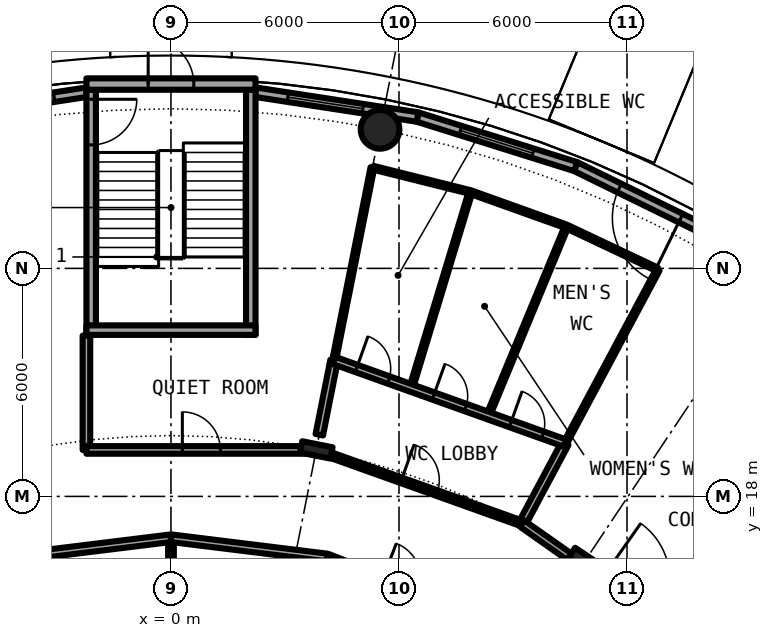
"""IFC4 building model, lengths in metres.
Left out: names, types, materials, properties, quantities, classifications, styles, units other than length and angle.
Written with IfcOpenShell. Run it as: python <this file> out.ifc"""

import sys

from ifc_helpers import new_model, si_unit, direction, frame, frame_2d, origin, origin_2d, place, context, subcontext, project, spatial, rectangle, hollow_circle, i_section, extrude, element, fill, save


model = new_model("IFC4")
c1 = context("Model", 3, precision=1e-05, world=origin(), true_north=direction((0.0, 1.0)))
c2 = subcontext(c1, "Body", "Model", "MODEL_VIEW")
j1 = project(units=[si_unit("LENGTHUNIT", "METRE"), si_unit("PLANEANGLEUNIT", "RADIAN")], contexts=[c1])
p1 = place(None, origin())
s1 = spatial("IfcSite", under=j1, at=p1, CompositionType="ELEMENT")
p2 = place(p1, origin())
s2 = spatial("IfcBuilding", under=s1, at=p2, CompositionType="ELEMENT")
p3 = place(p2, frame((0.0, 0.0, 9.6)))
s3 = spatial("IfcBuildingStorey", under=s2, at=p3, CompositionType="ELEMENT", Elevation=9.6)
p4 = place(p3, frame((5.501, 27.658, 0.0), z_axis=(0.0, 0.0, 1.0), x_axis=(1.0, 0.0, 0.0)))
e1 = element("IfcColumn", 1, at=p4, inside=s3, PredefinedType="COLUMN", context=c2, shape_type="SweptSolid", body=[
    extrude(hollow_circle(Radius=0.508, WallThickness=0.05, at=origin_2d()), origin(), (0.0, 0.0, 1.0), 4.5),
])
for number, where, z_axis, x_axis in (
    (2, (10.889, 16.297, 0.0), (0.0, 0.0, 1.0), (0.556, 0.831, 0.0)),
    (3, (3.824, 19.223, 0.0), (0.0, 0.0, 1.0), (0.195, 0.981, 0.0)),
):
    element("IfcColumn", number, at=place(p3, frame(where, z_axis=z_axis, x_axis=x_axis)), inside=s3, PredefinedType="COLUMN", context=c2, shape_type="SweptSolid", body=[
        extrude(i_section(OverallWidth=0.303, OverallDepth=0.814, WebThickness=0.021, FlangeThickness=0.04, FilletRadius=0.03, at=origin_2d()), origin(), (0.0, 0.0, 1.0), 4.5),
    ])
p5 = place(p3, frame((14.564, 24.759, 0.0), z_axis=(0.0, 0.0, 1.0), x_axis=(-0.897938079481, 0.440121807478, 0.0)))
e4 = element("IfcWall", 4, at=p5, inside=s3, PredefinedType="SOLIDWALL", context=c2, shape_type="SweptSolid", body=[
    extrude(rectangle(XDim=4.36, YDim=0.25, at=frame_2d((2.18, 0.0))), origin(), (0.0, 0.0, 1.0), 4.05),
])
p6 = place(p5, frame((1.28, 0.0, 0.0)))
e5 = element("IfcOpeningElement", 5, at=p6, cuts=e4, PredefinedType="OPENING", context=c2, shape_type="SweptSolid", body=[
    extrude(rectangle(XDim=1.8, YDim=2.2, at=frame_2d((0.9, 1.1))), frame((0.0, 0.135, 0.0), z_axis=(0.0, -1.0, 0.0), x_axis=(1.0, 0.0, 0.0)), (0.0, 0.0, 1.0), 0.27),
])
p7 = place(p3, frame((10.649, 26.678, 0.0), z_axis=(0.0, 0.0, 1.0), x_axis=(-0.954219534331, 0.299107138498, 0.0)))
e6 = element("IfcWall", 6, at=p7, inside=s3, PredefinedType="SOLIDWALL", context=c2, shape_type="SweptSolid", body=[
    extrude(rectangle(XDim=4.359, YDim=0.25, at=frame_2d((2.18, 0.0))), origin(), (0.0, 0.0, 1.0), 4.05),
])
p8 = place(p7, frame((1.18, 0.0, 0.9)))
e7 = element("IfcOpeningElement", 7, at=p8, cuts=e6, PredefinedType="OPENING", context=c2, shape_type="SweptSolid", body=[
    extrude(rectangle(XDim=2.0, YDim=2.4, at=frame_2d((1.0, 1.2))), frame((0.0, 0.135, 0.0), z_axis=(0.0, -1.0, 0.0), x_axis=(1.0, 0.0, 0.0)), (0.0, 0.0, 1.0), 0.27),
])
p9 = place(p3, frame((6.489, 27.982, 0.0), z_axis=(0.0, 0.0, 1.0), x_axis=(-0.988472895049, 0.151397938406, 0.0)))
e8 = element("IfcWall", 8, at=p9, inside=s3, PredefinedType="SOLIDWALL", context=c2, shape_type="SweptSolid", body=[
    extrude(rectangle(XDim=4.314, YDim=0.25, at=frame_2d((2.157, 0.0))), origin(), (0.0, 0.0, 1.0), 4.05),
])
p10 = place(p9, frame((1.455, 0.0, 0.9)))
e9 = element("IfcOpeningElement", 9, at=p10, cuts=e8, PredefinedType="OPENING", context=c2, shape_type="SweptSolid", body=[
    extrude(rectangle(XDim=2.0, YDim=2.4, at=frame_2d((1.0, 1.2))), frame((0.0, 0.135, 0.0), z_axis=(0.0, -1.0, 0.0), x_axis=(1.0, 0.0, 0.0)), (0.0, 0.0, 1.0), 0.27),
])
p11 = place(p3, frame((-2.225, 28.635, 0.0), z_axis=(0.0, 0.0, 1.0), x_axis=(-0.988472895049, -0.151397938406, 0.0)))
e10 = element("IfcWall", 10, at=p11, inside=s3, PredefinedType="SOLIDWALL", context=c2, shape_type="SweptSolid", body=[
    extrude(rectangle(XDim=4.314, YDim=0.25, at=frame_2d((2.157, 0.0))), origin(), (0.0, 0.0, 1.0), 4.05),
])
p12 = place(p11, frame((0.859, 0.0, 0.9)))
e11 = element("IfcOpeningElement", 11, at=p12, cuts=e10, PredefinedType="OPENING", context=c2, shape_type="SweptSolid", body=[
    extrude(rectangle(XDim=2.0, YDim=2.4, at=frame_2d((1.0, 1.2))), frame((0.0, 0.135, 0.0), z_axis=(0.0, -1.0, 0.0), x_axis=(1.0, 0.0, 0.0)), (0.0, 0.0, 1.0), 0.27),
])
p13 = place(p3, frame((-2.1, 28.7, 0.0), z_axis=(0.0, 0.0, 1.0), x_axis=(0.0, -1.0, 0.0)))
e12 = element("IfcWall", 12, at=p13, inside=s3, PredefinedType="SHEAR", context=c2, shape_type="SweptSolid", body=[
    extrude(rectangle(XDim=6.45, YDim=0.25, at=frame_2d((3.225, 0.0))), origin(), (0.0, 0.0, 1.0), 4.5),
])
p14 = place(p13, frame((0.25, 0.0, 0.0)))
e13 = element("IfcOpeningElement", 13, at=p14, cuts=e12, PredefinedType="OPENING", context=c2, shape_type="SweptSolid", body=[
    extrude(rectangle(XDim=1.2, YDim=2.3, at=frame_2d((0.6, 1.15))), frame((0.0, 0.135, 0.0), z_axis=(0.0, -1.0, 0.0), x_axis=(1.0, 0.0, 0.0)), (0.0, 0.0, 1.0), 0.27),
])
p15 = place(p3, frame((2.1, 22.25, 0.0), z_axis=(0.0, 0.0, 1.0), x_axis=(0.0, 1.0, 0.0)))
e14 = element("IfcWall", 14, at=p15, inside=s3, PredefinedType="SHEAR", context=c2, shape_type="SweptSolid", body=[
    extrude(rectangle(XDim=6.45, YDim=0.25, at=frame_2d((3.225, 0.0))), origin(), (0.0, 0.0, 1.0), 4.5),
])
p16 = place(p3, frame((2.225, 22.375, 0.0), z_axis=(0.0, 0.0, 1.0), x_axis=(-1.0, 0.0, 0.0)))
e15 = element("IfcWall", 15, at=p16, inside=s3, PredefinedType="SHEAR", context=c2, shape_type="SweptSolid", body=[
    extrude(rectangle(XDim=4.45, YDim=0.25, at=frame_2d((2.225, 0.0))), origin(), (0.0, 0.0, 1.0), 4.5),
])
p17 = place(p3, frame((-2.225, 28.85, 0.0), z_axis=(0.0, 0.0, 1.0), x_axis=(1.0, 0.0, 0.0)))
e16 = element("IfcWall", 16, at=p17, inside=s3, PredefinedType="SHEAR", context=c2, shape_type="SweptSolid", body=[
    extrude(rectangle(XDim=4.45, YDim=0.3, at=frame_2d((2.225, 0.0))), origin(), (0.0, 0.0, 1.0), 4.5),
])
p18 = place(p17, frame((1.625, 0.0, 0.0)))
e17 = element("IfcOpeningElement", 17, at=p18, cuts=e16, PredefinedType="OPENING", context=c2, shape_type="SweptSolid", body=[
    extrude(rectangle(XDim=1.2, YDim=2.3, at=frame_2d((0.6, 1.15))), frame((0.0, 0.16, 0.0), z_axis=(0.0, -1.0, 0.0), x_axis=(1.0, 0.0, 0.0)), (0.0, 0.0, 1.0), 0.32),
])
p19 = place(p3, frame((0.0, 7.72, 0.0), z_axis=(0.0, 0.0, 1.0), x_axis=(0.0, 1.0, 0.0)))
e18 = element("IfcWall", 18, at=p19, inside=s3, PredefinedType="PARTITIONING", context=c2, shape_type="SweptSolid", body=[
    extrude(rectangle(XDim=9.18, YDim=0.15, at=frame_2d((4.59, 0.0))), origin(), (0.0, 0.0, 1.0), 4.05),
])
p20 = place(p3, frame((3.903, 19.623, 0.0), z_axis=(0.0, 0.0, 1.0), x_axis=(0.195220503211, 0.980759376772, 0.0)))
e19 = element("IfcWall", 19, at=p20, inside=s3, PredefinedType="PARTITIONING", context=c2, shape_type="SweptSolid", body=[
    extrude(rectangle(XDim=1.992, YDim=0.2, at=frame_2d((0.996, 0.0))), origin(), (0.0, 0.0, 1.0), 4.05),
])
p21 = place(p3, frame((4.292, 21.577, 0.0), z_axis=(0.0, 0.0, 1.0), x_axis=(0.194963902417, 0.980810418355, 0.0)))
e20 = element("IfcWall", 20, at=p21, inside=s3, PredefinedType="PARTITIONING", context=c2, shape_type="SweptSolid", body=[
    extrude(rectangle(XDim=5.176, YDim=0.1, at=frame_2d((2.588, 0.0))), origin(), (0.0, 0.0, 1.0), 4.05),
])
p22 = place(p3, frame((6.319, 20.852, 0.0), z_axis=(0.0, 0.0, 1.0), x_axis=(0.289987267861, 0.957030503421, 0.0)))
e21 = element("IfcWall", 21, at=p22, inside=s3, PredefinedType="PARTITIONING", context=c2, shape_type="SweptSolid", body=[
    extrude(rectangle(XDim=5.386, YDim=0.1, at=frame_2d((2.693, 0.0))), origin(), (0.0, 0.0, 1.0), 4.05),
])
p23 = place(p3, frame((8.345, 20.127, 0.0), z_axis=(0.0, 0.0, 1.0), x_axis=(0.382973519041, 0.923759321313, 0.0)))
e22 = element("IfcWall", 22, at=p23, inside=s3, PredefinedType="PARTITIONING", context=c2, shape_type="SweptSolid", body=[
    extrude(rectangle(XDim=5.387, YDim=0.1, at=frame_2d((2.693, 0.0))), origin(), (0.0, 0.0, 1.0), 4.05),
])
p24 = place(p3, frame((9.242, 17.285, 0.0), z_axis=(0.0, 0.0, 1.0), x_axis=(0.471597030656, 0.88181417582, 0.0)))
e23 = element("IfcWall", 23, at=p24, inside=s3, PredefinedType="PARTITIONING", context=c2, shape_type="SweptSolid", body=[
    extrude(rectangle(XDim=2.398, YDim=0.2, at=frame_2d((1.199, 0.0))), origin(), (0.0, 0.0, 1.0), 4.05),
])
p25 = place(p3, frame((10.373, 19.401, 0.0), z_axis=(0.0, 0.0, 1.0), x_axis=(0.471444958676, 0.881895487537, 0.0)))
e24 = element("IfcWall", 24, at=p25, inside=s3, PredefinedType="PARTITIONING", context=c2, shape_type="SweptSolid", body=[
    extrude(rectangle(XDim=5.176, YDim=0.1, at=frame_2d((2.588, 0.0))), origin(), (0.0, 0.0, 1.0), 4.05),
])
p26 = place(p3, frame((-2.225, 19.223, 0.0), z_axis=(0.0, 0.0, 1.0), x_axis=(0.0, 1.0, 0.0)))
e25 = element("IfcWall", 25, at=p26, inside=s3, PredefinedType="PARTITIONING", context=c2, shape_type="SweptSolid", body=[
    extrude(rectangle(XDim=3.007, YDim=0.2, at=frame_2d((1.503, 0.0))), origin(), (0.0, 0.0, 1.0), 4.05),
])
for number, where, z_axis, x_axis in (
    (26, (-4.106, 16.394, 0.0), (0.0, 0.0, 1.0), (0.992, 0.122, 0.0)),
    (27, (0.0, 16.9, 0.0), (0.0, 0.0, 1.0), (0.992, -0.122, 0.0)),
):
    element("IfcWall", number, at=place(p3, frame(where, z_axis=z_axis, x_axis=x_axis)), inside=s3, PredefinedType="PARTITIONING", context=c2, shape_type="SweptSolid", body=[
        extrude(rectangle(XDim=4.137, YDim=0.2, at=frame_2d((2.068, 0.0))), origin(), (0.0, 0.0, 1.0), 4.05),
    ])
p27 = place(p3, frame((4.106, 16.394, 0.0), z_axis=(0.0, 0.0, 1.0), x_axis=(0.932943640288, -0.360022449363, 0.0)))
e28 = element("IfcWall", 28, at=p27, inside=s3, PredefinedType="PARTITIONING", context=c2, shape_type="SweptSolid", body=[
    extrude(rectangle(XDim=4.139, YDim=0.2, at=frame_2d((2.069, 0.0))), origin(), (0.0, 0.0, 1.0), 4.05),
])
p28 = place(p27, frame((1.569, 0.0, 0.0)))
e29 = element("IfcOpeningElement", 29, at=p28, cuts=e28, PredefinedType="OPENING", context=c2, shape_type="SweptSolid", body=[
    extrude(rectangle(XDim=1.0, YDim=2.3, at=frame_2d((0.5, 1.15))), frame((0.0, 0.11, 0.0), z_axis=(0.0, -1.0, 0.0), x_axis=(1.0, 0.0, 0.0)), (0.0, 0.0, 1.0), 0.22),
])
p29 = place(p3, frame((-2.225, 19.223, 0.0), z_axis=(0.0, 0.0, 1.0), x_axis=(1.0, 0.0, 0.0)))
e30 = element("IfcWall", 30, at=p29, inside=s3, PredefinedType="PARTITIONING", context=c2, shape_type="SweptSolid", body=[
    extrude(rectangle(XDim=5.894, YDim=0.2, at=frame_2d((2.947, 0.0))), origin(), (0.0, 0.0, 1.0), 3.63),
])
p30 = place(p29, frame((2.524, 0.0, 0.0)))
e31 = element("IfcOpeningElement", 31, at=p30, cuts=e30, PredefinedType="OPENING", context=c2, shape_type="SweptSolid", body=[
    extrude(rectangle(XDim=1.0, YDim=2.3, at=frame_2d((0.5, 1.15))), frame((0.0, 0.11, 0.0), z_axis=(0.0, -1.0, 0.0), x_axis=(1.0, 0.0, 0.0)), (0.0, 0.0, 1.0), 0.22),
])
p31 = place(p3, frame((3.968, 19.172, 0.0), z_axis=(0.0, 0.0, 1.0), x_axis=(0.941530584678, -0.336927526504, 0.0)))
e32 = element("IfcWall", 32, at=p31, inside=s3, PredefinedType="PARTITIONING", context=c2, shape_type="SweptSolid", body=[
    extrude(rectangle(XDim=5.598, YDim=0.15, at=frame_2d((2.799, 0.0))), origin(), (0.0, 0.0, 1.0), 3.63),
])
p32 = place(p31, frame((2.223, 0.0, 0.0)))
e33 = element("IfcOpeningElement", 33, at=p32, cuts=e32, PredefinedType="OPENING", context=c2, shape_type="SweptSolid", body=[
    extrude(rectangle(XDim=1.0, YDim=2.3, at=frame_2d((0.5, 1.15))), frame((0.0, 0.085, 0.0), z_axis=(0.0, -1.0, 0.0), x_axis=(1.0, 0.0, 0.0)), (0.0, 0.0, 1.0), 0.17),
])
p33 = place(p3, frame((9.239, 17.286, 0.0), z_axis=(0.0, 0.0, 1.0), x_axis=(0.817849682833, -0.575431921508, 0.0)))
e34 = element("IfcWall", 34, at=p33, inside=s3, PredefinedType="PARTITIONING", context=c2, shape_type="SweptSolid", body=[
    extrude(rectangle(XDim=1.771, YDim=0.2, at=frame_2d((0.885, 0.0))), origin(), (0.0, 0.0, 1.0), 3.63),
])
p34 = place(p3, frame((4.292, 21.577, 0.0), z_axis=(0.0, 0.0, 1.0), x_axis=(0.941534771306, -0.336915826909, 0.0)))
e35 = element("IfcWall", 35, at=p34, inside=s3, PredefinedType="PARTITIONING", context=c2, shape_type="SweptSolid", body=[
    extrude(rectangle(XDim=6.459, YDim=0.2, at=frame_2d((3.229, 0.0))), origin(), (0.0, 0.0, 1.0), 4.05),
])
p35 = place(p34, frame((4.931, 0.0, 0.0)))
e36 = element("IfcOpeningElement", 36, at=p35, cuts=e35, PredefinedType="OPENING", context=c2, shape_type="SweptSolid", body=[
    extrude(rectangle(XDim=0.9, YDim=2.3, at=frame_2d((0.45, 1.15))), frame((0.0, 0.11, 0.0), z_axis=(0.0, -1.0, 0.0), x_axis=(1.0, 0.0, 0.0)), (0.0, 0.0, 1.0), 0.22),
])
p36 = place(p34, frame((2.778, 0.0, 0.0)))
e37 = element("IfcOpeningElement", 37, at=p36, cuts=e35, PredefinedType="OPENING", context=c2, shape_type="SweptSolid", body=[
    extrude(rectangle(XDim=0.9, YDim=2.3, at=frame_2d((0.45, 1.15))), frame((0.0, 0.11, 0.0), z_axis=(0.0, -1.0, 0.0), x_axis=(1.0, 0.0, 0.0)), (0.0, 0.0, 1.0), 0.22),
])
p37 = place(p34, frame((0.626, 0.0, 0.0)))
e38 = element("IfcOpeningElement", 38, at=p37, cuts=e35, PredefinedType="OPENING", context=c2, shape_type="SweptSolid", body=[
    extrude(rectangle(XDim=0.9, YDim=2.3, at=frame_2d((0.45, 1.15))), frame((0.0, 0.11, 0.0), z_axis=(0.0, -1.0, 0.0), x_axis=(1.0, 0.0, 0.0)), (0.0, 0.0, 1.0), 0.22),
])
p38 = place(p3, frame((10.425, 25.094, 0.0), z_axis=(0.0, 0.0, 1.0), x_axis=(0.904075542006, -0.427372687882, 0.0)))
e39 = element("IfcWall", 39, at=p38, inside=s3, PredefinedType="PARTITIONING", context=c2, shape_type="SweptSolid", body=[
    extrude(rectangle(XDim=2.618, YDim=0.1, at=frame_2d((1.309, 0.0))), origin(), (0.0, 0.0, 1.0), 4.05),
])
p39 = place(p3, frame((7.899, 26.001, 0.0), z_axis=(0.0, 0.0, 1.0), x_axis=(0.94150976765, -0.336985693198, 0.0)))
e40 = element("IfcWall", 40, at=p39, inside=s3, PredefinedType="PARTITIONING", context=c2, shape_type="SweptSolid", body=[
    extrude(rectangle(XDim=2.644, YDim=0.1, at=frame_2d((1.322, 0.0))), origin(), (0.0, 0.0, 1.0), 4.05),
])
p40 = place(p3, frame((5.321, 26.648, 0.0), z_axis=(0.0, 0.0, 1.0), x_axis=(0.970054682641, -0.242886625171, 0.0)))
e41 = element("IfcWall", 41, at=p40, inside=s3, PredefinedType="PARTITIONING", context=c2, shape_type="SweptSolid", body=[
    extrude(rectangle(XDim=2.618, YDim=0.1, at=frame_2d((1.309, 0.0))), origin(), (0.0, 0.0, 1.0), 4.05),
])
p41 = place(p6, origin())
e42 = element("IfcDoor", 42, at=p41, inside=s3, OperationType="SINGLE_SWING_LEFT", PredefinedType="DOOR", context=c2, shape_type="SweptSolid", body=[
    extrude(rectangle(XDim=1.8, YDim=2.2, at=frame_2d((0.9, 1.1))), frame((0.0, 0.025, 0.0), z_axis=(0.0, -1.0, 0.0), x_axis=(1.0, 0.0, 0.0)), (0.0, 0.0, 1.0), 0.05),
])
fill(e5, e42)
p42 = place(p8, origin())
e43 = element("IfcWindow", 43, at=p42, inside=s3, PartitioningType="SINGLE_PANEL", PredefinedType="WINDOW", context=c2, shape_type="SweptSolid", body=[
    extrude(rectangle(XDim=2.0, YDim=2.4, at=frame_2d((1.0, 1.2))), frame((0.0, 0.03, 0.0), z_axis=(0.0, -1.0, 0.0), x_axis=(1.0, 0.0, 0.0)), (0.0, 0.0, 1.0), 0.06),
])
fill(e7, e43)
p43 = place(p10, origin())
e44 = element("IfcWindow", 44, at=p43, inside=s3, PartitioningType="SINGLE_PANEL", PredefinedType="WINDOW", context=c2, shape_type="SweptSolid", body=[
    extrude(rectangle(XDim=2.0, YDim=2.4, at=frame_2d((1.0, 1.2))), frame((0.0, 0.03, 0.0), z_axis=(0.0, -1.0, 0.0), x_axis=(1.0, 0.0, 0.0)), (0.0, 0.0, 1.0), 0.06),
])
fill(e9, e44)
p44 = place(p12, origin())
e45 = element("IfcWindow", 45, at=p44, inside=s3, PartitioningType="SINGLE_PANEL", PredefinedType="WINDOW", context=c2, shape_type="SweptSolid", body=[
    extrude(rectangle(XDim=2.0, YDim=2.4, at=frame_2d((1.0, 1.2))), frame((0.0, 0.03, 0.0), z_axis=(0.0, -1.0, 0.0), x_axis=(1.0, 0.0, 0.0)), (0.0, 0.0, 1.0), 0.06),
])
fill(e11, e45)
p45 = place(p14, origin())
e46 = element("IfcDoor", 46, at=p45, inside=s3, OperationType="SINGLE_SWING_RIGHT", PredefinedType="DOOR", context=c2, shape_type="SweptSolid", body=[
    extrude(rectangle(XDim=1.2, YDim=2.3, at=frame_2d((0.6, 1.15))), frame((0.0, 0.025, 0.0), z_axis=(0.0, -1.0, 0.0), x_axis=(1.0, 0.0, 0.0)), (0.0, 0.0, 1.0), 0.05),
])
fill(e13, e46)
p46 = place(p18, origin())
e47 = element("IfcDoor", 47, at=p46, inside=s3, OperationType="SINGLE_SWING_LEFT", PredefinedType="DOOR", context=c2, shape_type="SweptSolid", body=[
    extrude(rectangle(XDim=1.2, YDim=2.3, at=frame_2d((0.6, 1.15))), frame((0.0, 0.025, 0.0), z_axis=(0.0, -1.0, 0.0), x_axis=(1.0, 0.0, 0.0)), (0.0, 0.0, 1.0), 0.05),
])
fill(e17, e47)
p47 = place(p32, origin())
e48 = element("IfcDoor", 48, at=p47, inside=s3, OperationType="SINGLE_SWING_LEFT", PredefinedType="DOOR", context=c2, shape_type="SweptSolid", body=[
    extrude(rectangle(XDim=1.0, YDim=2.3, at=frame_2d((0.5, 1.15))), frame((0.0, 0.025, 0.0), z_axis=(0.0, -1.0, 0.0), x_axis=(1.0, 0.0, 0.0)), (0.0, 0.0, 1.0), 0.05),
])
fill(e33, e48)
p48 = place(p35, origin())
e49 = element("IfcDoor", 49, at=p48, inside=s3, OperationType="SINGLE_SWING_RIGHT", PredefinedType="DOOR", context=c2, shape_type="SweptSolid", body=[
    extrude(rectangle(XDim=0.9, YDim=2.3, at=frame_2d((0.45, 1.15))), frame((0.0, 0.025, 0.0), z_axis=(0.0, -1.0, 0.0), x_axis=(1.0, 0.0, 0.0)), (0.0, 0.0, 1.0), 0.05),
])
fill(e36, e49)
p49 = place(p36, origin())
e50 = element("IfcDoor", 50, at=p49, inside=s3, OperationType="SINGLE_SWING_LEFT", PredefinedType="DOOR", context=c2, shape_type="SweptSolid", body=[
    extrude(rectangle(XDim=0.9, YDim=2.3, at=frame_2d((0.45, 1.15))), frame((0.0, 0.025, 0.0), z_axis=(0.0, -1.0, 0.0), x_axis=(1.0, 0.0, 0.0)), (0.0, 0.0, 1.0), 0.05),
])
fill(e37, e50)
p50 = place(p37, origin())
e51 = element("IfcDoor", 51, at=p50, inside=s3, OperationType="SINGLE_SWING_LEFT", PredefinedType="DOOR", context=c2, shape_type="SweptSolid", body=[
    extrude(rectangle(XDim=0.9, YDim=2.3, at=frame_2d((0.45, 1.15))), frame((0.0, 0.025, 0.0), z_axis=(0.0, -1.0, 0.0), x_axis=(1.0, 0.0, 0.0)), (0.0, 0.0, 1.0), 0.05),
])
fill(e38, e51)
p51 = place(p30, origin())
e52 = element("IfcDoor", 52, at=p51, inside=s3, OperationType="SINGLE_SWING_RIGHT", PredefinedType="DOOR", context=c2, shape_type="SweptSolid", body=[
    extrude(rectangle(XDim=1.0, YDim=2.3, at=frame_2d((0.5, 1.15))), frame((0.0, 0.025, 0.0), z_axis=(0.0, -1.0, 0.0), x_axis=(1.0, 0.0, 0.0)), (0.0, 0.0, 1.0), 0.05),
])
fill(e31, e52)
save(model, sys.argv[1])
